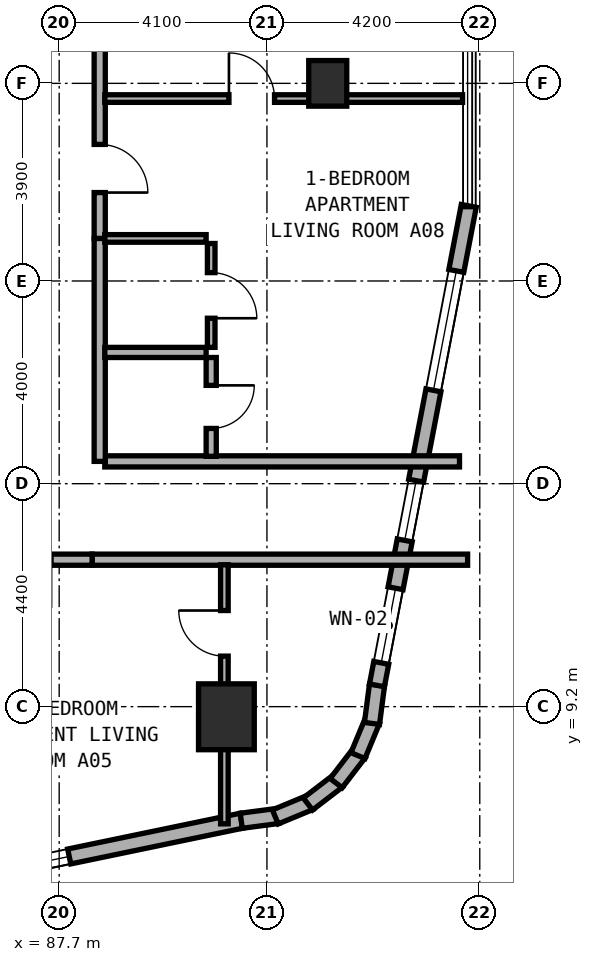
"""IFC4 building model, lengths in metres.
Left out: names, types, materials, properties, quantities, classifications, styles, units other than length and angle.
Written with IfcOpenShell. Run it as: python <this file> out.ifc"""

import sys

from ifc_helpers import new_model, si_unit, direction, frame, frame_2d, origin, origin_2d, place, context, subcontext, project, spatial, rectangle, extrude, element, fill, save


model = new_model("IFC4")
c1 = context("Model", 3, precision=1e-05, world=origin(), true_north=direction((0.0, 1.0)))
c2 = subcontext(c1, "Body", "Model", "MODEL_VIEW")
j1 = project(units=[si_unit("LENGTHUNIT", "METRE"), si_unit("PLANEANGLEUNIT", "RADIAN")], contexts=[c1])
p1 = place(None, origin())
s1 = spatial("IfcSite", under=j1, at=p1, CompositionType="ELEMENT")
p2 = place(p1, origin())
s2 = spatial("IfcBuilding", under=s1, at=p2, CompositionType="ELEMENT")
p3 = place(p2, frame((0.0, 0.0, 52.0)))
s3 = spatial("IfcBuildingStorey", under=s2, at=p3, CompositionType="ELEMENT", Elevation=52.0)
p4 = place(p3, frame((93.0, 21.5, 0.0), z_axis=(0.0, 0.0, 1.0), x_axis=(1.0, 0.0, 0.0)))
e1 = element("IfcColumn", 1, at=p4, inside=s3, PredefinedType="COLUMN", context=c2, shape_type="SweptSolid", body=[
    extrude(rectangle(XDim=0.75, YDim=0.9, at=origin_2d()), origin(), (0.0, 0.0, 1.0), 3.5),
])
p5 = place(p3, frame((91.0, 9.0, 0.0), z_axis=(0.0, 0.0, 1.0), x_axis=(1.0, 0.0, 0.0)))
e2 = element("IfcColumn", 2, at=p5, inside=s3, PredefinedType="COLUMN", context=c2, shape_type="SweptSolid", body=[
    extrude(rectangle(XDim=1.1, YDim=1.3, at=origin_2d()), origin(), (0.0, 0.0, 1.0), 3.5),
])
p6 = place(p3, frame((82.564, 5.136, 0.0), z_axis=(0.0, 0.0, 1.0), x_axis=(0.979128391325, 0.203242695569, 0.0)))
e3 = element("IfcWall", 3, at=p6, inside=s3, PredefinedType="STANDARD", context=c2, shape_type="SweptSolid", body=[
    extrude(rectangle(XDim=8.92, YDim=0.3, at=frame_2d((4.46, 0.0))), origin(), (0.0, 0.0, 1.0), 3.25),
])
p7 = place(p6, frame((3.048, 0.0, 0.8)))
e4 = element("IfcOpeningElement", 4, at=p7, cuts=e3, PredefinedType="OPENING", context=c2, shape_type="SweptSolid", body=[
    extrude(rectangle(XDim=2.4, YDim=1.6, at=frame_2d((1.2, 0.8))), frame((0.0, 0.16, 0.0), z_axis=(0.0, -1.0, 0.0), x_axis=(1.0, 0.0, 0.0)), (0.0, 0.0, 1.0), 0.32),
])
p8 = place(p3, frame((91.293, 6.948, 0.0), z_axis=(0.0, 0.0, 1.0), x_axis=(0.991486167159, 0.13021205909, 0.0)))
e5 = element("IfcWall", 5, at=p8, inside=s3, PredefinedType="STANDARD", context=c2, shape_type="SweptSolid", body=[
    extrude(rectangle(XDim=0.729, YDim=0.3, at=frame_2d((0.365, 0.0))), origin(), (0.0, 0.0, 1.0), 3.25),
])
for number, where, z_axis, x_axis in (
    (6, (91.965, 7.024, 0.0), (0.0, 0.0, 1.0), (0.924, 0.384, 0.0)),
    (7, (92.609, 7.279, 0.0), (0.0, 0.0, 1.0), (0.794, 0.608, 0.0)),
    (8, (93.166, 7.691, 0.0), (0.0, 0.0, 1.0), (0.609, 0.793, 0.0)),
):
    element("IfcWall", number, at=place(p3, frame(where, z_axis=z_axis, x_axis=x_axis)), inside=s3, PredefinedType="STANDARD", context=c2, shape_type="SweptSolid", body=[
        extrude(rectangle(XDim=0.746, YDim=0.3, at=frame_2d((0.373, 0.0))), origin(), (0.0, 0.0, 1.0), 3.25),
    ])
p9 = place(p3, frame((93.596, 8.234, 0.0), z_axis=(0.0, 0.0, 1.0), x_axis=(0.383430326427, 0.923569805037, 0.0)))
e9 = element("IfcWall", 9, at=p9, inside=s3, PredefinedType="STANDARD", context=c2, shape_type="SweptSolid", body=[
    extrude(rectangle(XDim=0.746, YDim=0.3, at=frame_2d((0.373, 0.0))), origin(), (0.0, 0.0, 1.0), 3.25),
])
p10 = place(p3, frame((93.873, 8.869, 0.0), z_axis=(0.0, 0.0, 1.0), x_axis=(0.129339184068, 0.991600411186, 0.0)))
e10 = element("IfcWall", 10, at=p10, inside=s3, PredefinedType="STANDARD", context=c2, shape_type="SweptSolid", body=[
    extrude(rectangle(XDim=0.764, YDim=0.3, at=frame_2d((0.382, 0.0))), origin(), (0.0, 0.0, 1.0), 3.25),
])
p11 = place(p3, frame((93.971, 9.62, 0.0), z_axis=(0.0, 0.0, 1.0), x_axis=(0.188087874316, 0.982152203854, 0.0)))
e11 = element("IfcWall", 11, at=p11, inside=s3, PredefinedType="STANDARD", context=c2, shape_type="SweptSolid", body=[
    extrude(rectangle(XDim=9.634, YDim=0.3, at=frame_2d((4.817, 0.0))), origin(), (0.0, 0.0, 1.0), 3.25),
])
p12 = place(p11, frame((0.452, 0.0, 0.85)))
e12 = element("IfcOpeningElement", 12, at=p12, cuts=e11, PredefinedType="OPENING", context=c2, shape_type="SweptSolid", body=[
    extrude(rectangle(XDim=1.5, YDim=1.5, at=frame_2d((0.75, 0.75))), frame((0.0, 0.16, 0.0), z_axis=(0.0, -1.0, 0.0), x_axis=(1.0, 0.0, 0.0)), (0.0, 0.0, 1.0), 0.32),
])
p13 = place(p11, frame((2.913, 0.0, 0.85)))
e13 = element("IfcOpeningElement", 13, at=p13, cuts=e11, PredefinedType="OPENING", context=c2, shape_type="SweptSolid", body=[
    extrude(rectangle(XDim=1.2, YDim=1.5, at=frame_2d((0.6, 0.75))), frame((0.0, 0.16, 0.0), z_axis=(0.0, -1.0, 0.0), x_axis=(1.0, 0.0, 0.0)), (0.0, 0.0, 1.0), 0.32),
])
p14 = place(p11, frame((5.928, 0.0, 0.8)))
e14 = element("IfcOpeningElement", 14, at=p14, cuts=e11, PredefinedType="OPENING", context=c2, shape_type="SweptSolid", body=[
    extrude(rectangle(XDim=2.4, YDim=1.6, at=frame_2d((1.2, 0.8))), frame((0.0, 0.16, 0.0), z_axis=(0.0, -1.0, 0.0), x_axis=(1.0, 0.0, 0.0)), (0.0, 0.0, 1.0), 0.32),
])
p15 = place(p3, frame((88.35, 12.1, 0.0), z_axis=(0.0, 0.0, 1.0), x_axis=(1.0, 0.0, 0.0)))
e15 = element("IfcWall", 15, at=p15, inside=s3, PredefinedType="SOLIDWALL", context=c2, shape_type="SweptSolid", body=[
    extrude(rectangle(XDim=7.41, YDim=0.22, at=frame_2d((3.705, 0.0))), origin(), (0.0, 0.0, 1.0), 2.865),
])
p16 = place(p3, frame((85.78, 12.1, 0.0), z_axis=(0.0, 0.0, 1.0), x_axis=(1.0, 0.0, 0.0)))
e16 = element("IfcWall", 16, at=p16, inside=s3, PredefinedType="SOLIDWALL", context=c2, shape_type="SweptSolid", body=[
    extrude(rectangle(XDim=2.57, YDim=0.22, at=frame_2d((1.285, 0.0))), origin(), (0.0, 0.0, 1.0), 3.22),
])
p17 = place(p16, frame((0.81, 0.0, 0.0)))
e17 = element("IfcOpeningElement", 17, at=p17, cuts=e16, PredefinedType="OPENING", context=c2, shape_type="SweptSolid", body=[
    extrude(rectangle(XDim=0.95, YDim=2.1, at=frame_2d((0.475, 1.05))), frame((0.0, 0.12, 0.0), z_axis=(0.0, -1.0, 0.0), x_axis=(1.0, 0.0, 0.0)), (0.0, 0.0, 1.0), 0.24),
])
p18 = place(p3, frame((90.96, 6.887, 0.0), z_axis=(0.0, 0.0, 1.0), x_axis=(0.0, 1.0, 0.0)))
e18 = element("IfcWall", 18, at=p18, inside=s3, PredefinedType="PARTITIONING", context=c2, shape_type="SweptSolid", body=[
    extrude(rectangle(XDim=5.113, YDim=0.15, at=frame_2d((2.557, 0.0))), origin(), (0.0, 0.0, 1.0), 2.865),
])
p19 = place(p18, frame((3.31, 0.0, 0.0)))
e19 = element("IfcOpeningElement", 19, at=p19, cuts=e18, PredefinedType="OPENING", context=c2, shape_type="SweptSolid", body=[
    extrude(rectangle(XDim=0.9, YDim=2.1, at=frame_2d((0.45, 1.05))), frame((0.0, 0.085, 0.0), z_axis=(0.0, -1.0, 0.0), x_axis=(1.0, 0.0, 0.0)), (0.0, 0.0, 1.0), 0.17),
])
p20 = place(p3, frame((88.6, 14.04, 0.0), z_axis=(0.0, 0.0, 1.0), x_axis=(1.0, 0.0, 0.0)))
e20 = element("IfcWall", 20, at=p20, inside=s3, PredefinedType="SOLIDWALL", context=c2, shape_type="SweptSolid", body=[
    extrude(rectangle(XDim=7.0, YDim=0.22, at=frame_2d((3.5, 0.0))), origin(), (0.0, 0.0, 1.0), 2.865),
])
p21 = place(p3, frame((88.5, 14.04, 0.0), z_axis=(0.0, 0.0, 1.0), x_axis=(0.0, 1.0, 0.0)))
e21 = element("IfcWall", 21, at=p21, inside=s3, PredefinedType="SOLIDWALL", context=c2, shape_type="SweptSolid", body=[
    extrude(rectangle(XDim=4.4, YDim=0.22, at=frame_2d((2.2, 0.0))), origin(), (0.0, 0.0, 1.0), 3.22),
])
p22 = place(p3, frame((88.5, 18.44, 0.0), z_axis=(0.0, 0.0, 1.0), x_axis=(0.0, 1.0, 0.0)))
e22 = element("IfcWall", 22, at=p22, inside=s3, PredefinedType="SOLIDWALL", context=c2, shape_type="SweptSolid", body=[
    extrude(rectangle(XDim=6.56, YDim=0.22, at=frame_2d((3.28, 0.0))), origin(), (0.0, 0.0, 1.0), 2.725),
])
p23 = place(p22, frame((0.905, 0.0, 0.0)))
e23 = element("IfcOpeningElement", 23, at=p23, cuts=e22, PredefinedType="OPENING", context=c2, shape_type="SweptSolid", body=[
    extrude(rectangle(XDim=0.95, YDim=2.1, at=frame_2d((0.475, 1.05))), frame((0.0, 0.12, 0.0), z_axis=(0.0, -1.0, 0.0), x_axis=(1.0, 0.0, 0.0)), (0.0, 0.0, 1.0), 0.24),
])
p24 = place(p3, frame((88.6, 21.2, 0.0), z_axis=(0.0, 0.0, 1.0), x_axis=(1.0, 0.0, 0.0)))
e24 = element("IfcWall", 24, at=p24, inside=s3, PredefinedType="PARTITIONING", context=c2, shape_type="SweptSolid", body=[
    extrude(rectangle(XDim=7.06, YDim=0.15, at=frame_2d((3.53, 0.0))), origin(), (0.0, 0.0, 1.0), 2.865),
])
p25 = place(p24, frame((2.45, 0.0, 0.0)))
e25 = element("IfcOpeningElement", 25, at=p25, cuts=e24, PredefinedType="OPENING", context=c2, shape_type="SweptSolid", body=[
    extrude(rectangle(XDim=0.9, YDim=2.1, at=frame_2d((0.45, 1.05))), frame((0.0, 0.085, 0.0), z_axis=(0.0, -1.0, 0.0), x_axis=(1.0, 0.0, 0.0)), (0.0, 0.0, 1.0), 0.17),
])
p26 = place(p3, frame((88.6, 16.19, 0.0), z_axis=(0.0, 0.0, 1.0), x_axis=(1.0, 0.0, 0.0)))
e26 = element("IfcWall", 26, at=p26, inside=s3, PredefinedType="PLUMBINGWALL", context=c2, shape_type="SweptSolid", body=[
    extrude(rectangle(XDim=2.0, YDim=0.2, at=frame_2d((1.0, 0.0))), origin(), (0.0, 0.0, 1.0), 3.22),
])
p27 = place(p3, frame((88.6, 18.44, 0.0), z_axis=(0.0, 0.0, 1.0), x_axis=(1.0, 0.0, 0.0)))
e27 = element("IfcWall", 27, at=p27, inside=s3, PredefinedType="PARTITIONING", context=c2, shape_type="SweptSolid", body=[
    extrude(rectangle(XDim=2.0, YDim=0.15, at=frame_2d((1.0, 0.0))), origin(), (0.0, 0.0, 1.0), 3.22),
])
p28 = place(p3, frame((90.7, 14.14, 0.0), z_axis=(0.0, 0.0, 1.0), x_axis=(0.0, 1.0, 0.0)))
e28 = element("IfcWall", 28, at=p28, inside=s3, PredefinedType="PLUMBINGWALL", context=c2, shape_type="SweptSolid", body=[
    extrude(rectangle(XDim=1.95, YDim=0.2, at=frame_2d((0.975, 0.0))), origin(), (0.0, 0.0, 1.0), 3.22),
])
p29 = place(p28, frame((0.55, 0.0, 0.0)))
e29 = element("IfcOpeningElement", 29, at=p29, cuts=e28, PredefinedType="OPENING", context=c2, shape_type="SweptSolid", body=[
    extrude(rectangle(XDim=0.85, YDim=2.1, at=frame_2d((0.425, 1.05))), frame((0.0, 0.11, 0.0), z_axis=(0.0, -1.0, 0.0), x_axis=(1.0, 0.0, 0.0)), (0.0, 0.0, 1.0), 0.22),
])
p30 = place(p3, frame((90.7, 16.29, 0.0), z_axis=(0.0, 0.0, 1.0), x_axis=(0.0, 1.0, 0.0)))
e30 = element("IfcWall", 30, at=p30, inside=s3, PredefinedType="PARTITIONING", context=c2, shape_type="SweptSolid", body=[
    extrude(rectangle(XDim=2.05, YDim=0.15, at=frame_2d((1.025, 0.0))), origin(), (0.0, 0.0, 1.0), 3.22),
])
p31 = place(p30, frame((0.575, 0.0, 0.0)))
e31 = element("IfcOpeningElement", 31, at=p31, cuts=e30, PredefinedType="OPENING", context=c2, shape_type="SweptSolid", body=[
    extrude(rectangle(XDim=0.9, YDim=2.1, at=frame_2d((0.45, 1.05))), frame((0.0, 0.085, 0.0), z_axis=(0.0, -1.0, 0.0), x_axis=(1.0, 0.0, 0.0)), (0.0, 0.0, 1.0), 0.17),
])
p32 = place(p7, origin())
e32 = element("IfcWindow", 32, at=p32, inside=s3, PartitioningType="SINGLE_PANEL", PredefinedType="WINDOW", context=c2, shape_type="SweptSolid", body=[
    extrude(rectangle(XDim=2.4, YDim=1.6, at=frame_2d((1.2, 0.8))), frame((0.0, 0.03, 0.0), z_axis=(0.0, -1.0, 0.0), x_axis=(1.0, 0.0, 0.0)), (0.0, 0.0, 1.0), 0.06),
])
fill(e4, e32)
p33 = place(p12, origin())
e33 = element("IfcWindow", 33, at=p33, inside=s3, PartitioningType="SINGLE_PANEL", PredefinedType="WINDOW", context=c2, shape_type="SweptSolid", body=[
    extrude(rectangle(XDim=1.5, YDim=1.5, at=frame_2d((0.75, 0.75))), frame((0.0, 0.03, 0.0), z_axis=(0.0, -1.0, 0.0), x_axis=(1.0, 0.0, 0.0)), (0.0, 0.0, 1.0), 0.06),
])
fill(e12, e33)
p34 = place(p13, origin())
e34 = element("IfcWindow", 34, at=p34, inside=s3, PartitioningType="SINGLE_PANEL", PredefinedType="WINDOW", context=c2, shape_type="SweptSolid", body=[
    extrude(rectangle(XDim=1.2, YDim=1.5, at=frame_2d((0.6, 0.75))), frame((0.0, 0.03, 0.0), z_axis=(0.0, -1.0, 0.0), x_axis=(1.0, 0.0, 0.0)), (0.0, 0.0, 1.0), 0.06),
])
fill(e13, e34)
p35 = place(p14, origin())
e35 = element("IfcWindow", 35, at=p35, inside=s3, PartitioningType="SINGLE_PANEL", PredefinedType="WINDOW", context=c2, shape_type="SweptSolid", body=[
    extrude(rectangle(XDim=2.4, YDim=1.6, at=frame_2d((1.2, 0.8))), frame((0.0, 0.03, 0.0), z_axis=(0.0, -1.0, 0.0), x_axis=(1.0, 0.0, 0.0)), (0.0, 0.0, 1.0), 0.06),
])
fill(e14, e35)
p36 = place(p19, origin())
e36 = element("IfcDoor", 36, at=p36, inside=s3, OperationType="SINGLE_SWING_RIGHT", PredefinedType="DOOR", context=c2, shape_type="SweptSolid", body=[
    extrude(rectangle(XDim=0.9, YDim=2.1, at=frame_2d((0.45, 1.05))), frame((0.0, 0.025, 0.0), z_axis=(0.0, -1.0, 0.0), x_axis=(1.0, 0.0, 0.0)), (0.0, 0.0, 1.0), 0.05),
])
fill(e19, e36)
p37 = place(p23, frame((0.95, 0.0, 0.0), z_axis=(0.0, 0.0, 1.0), x_axis=(-1.0, 0.0, 0.0)))
e37 = element("IfcDoor", 37, at=p37, inside=s3, OperationType="SINGLE_SWING_RIGHT", PredefinedType="DOOR", context=c2, shape_type="SweptSolid", body=[
    extrude(rectangle(XDim=0.95, YDim=2.1, at=frame_2d((0.475, 1.05))), frame((0.0, 0.025, 0.0), z_axis=(0.0, -1.0, 0.0), x_axis=(1.0, 0.0, 0.0)), (0.0, 0.0, 1.0), 0.05),
])
fill(e23, e37)
p38 = place(p25, origin())
e38 = element("IfcDoor", 38, at=p38, inside=s3, OperationType="SINGLE_SWING_LEFT", PredefinedType="DOOR", context=c2, shape_type="SweptSolid", body=[
    extrude(rectangle(XDim=0.9, YDim=2.1, at=frame_2d((0.45, 1.05))), frame((0.0, 0.025, 0.0), z_axis=(0.0, -1.0, 0.0), x_axis=(1.0, 0.0, 0.0)), (0.0, 0.0, 1.0), 0.05),
])
fill(e25, e38)
p39 = place(p29, frame((0.85, 0.0, 0.0), z_axis=(0.0, 0.0, 1.0), x_axis=(-1.0, 0.0, 0.0)))
e39 = element("IfcDoor", 39, at=p39, inside=s3, OperationType="SINGLE_SWING_LEFT", PredefinedType="DOOR", context=c2, shape_type="SweptSolid", body=[
    extrude(rectangle(XDim=0.85, YDim=2.1, at=frame_2d((0.425, 1.05))), frame((0.0, 0.025, 0.0), z_axis=(0.0, -1.0, 0.0), x_axis=(1.0, 0.0, 0.0)), (0.0, 0.0, 1.0), 0.05),
])
fill(e29, e39)
p40 = place(p31, frame((0.9, 0.0, 0.0), z_axis=(0.0, 0.0, 1.0), x_axis=(-1.0, 0.0, 0.0)))
e40 = element("IfcDoor", 40, at=p40, inside=s3, OperationType="SINGLE_SWING_RIGHT", PredefinedType="DOOR", context=c2, shape_type="SweptSolid", body=[
    extrude(rectangle(XDim=0.9, YDim=2.1, at=frame_2d((0.45, 1.05))), frame((0.0, 0.025, 0.0), z_axis=(0.0, -1.0, 0.0), x_axis=(1.0, 0.0, 0.0)), (0.0, 0.0, 1.0), 0.05),
])
fill(e31, e40)
save(model, sys.argv[1])
